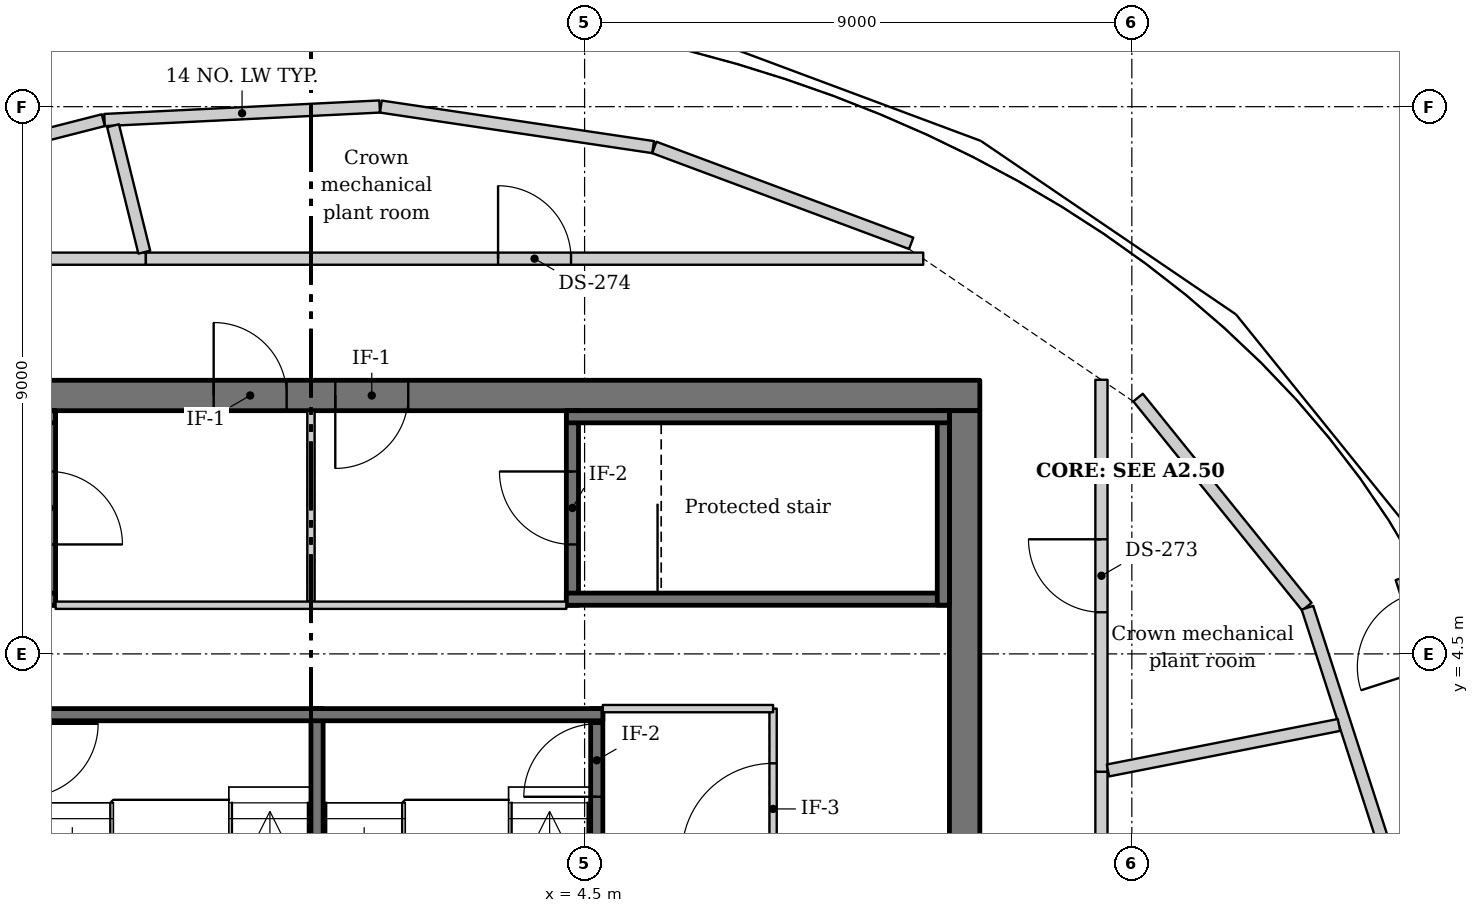
"""IFC4 building model, lengths in metres.
Left out: names, types, materials, properties, quantities, classifications, styles, units other than length and angle.
Written with IfcOpenShell. Run it as: python <this file> out.ifc"""

import sys

from ifc_helpers import new_model, si_unit, direction, frame, frame_2d, origin, place, context, subcontext, project, spatial, rectangle, extrude, source, transform, mapped, element, fill, save


model = new_model("IFC4")
c1 = context("Model", 3, precision=1e-05, world=origin(), true_north=direction((0.0, 1.0)))
c2 = subcontext(c1, "Body", "Model", "MODEL_VIEW")
j1 = project(units=[si_unit("LENGTHUNIT", "METRE"), si_unit("PLANEANGLEUNIT", "RADIAN")], contexts=[c1])
p1 = place(None, origin())
s1 = spatial("IfcSite", under=j1, at=p1, CompositionType="ELEMENT")
p2 = place(p1, origin())
s2 = spatial("IfcBuilding", under=s1, at=p2, CompositionType="ELEMENT")
p3 = place(p2, frame((0.0, 0.0, 352.0)))
s3 = spatial("IfcBuildingStorey", under=s2, at=p3, CompositionType="ELEMENT", Elevation=352.0)
m1 = source(origin(), c2, "Body", "SweptSolid", [
    extrude(rectangle(XDim=22.0, YDim=0.5, at=frame_2d((11.0, 0.0))), origin(), (0.0, 0.0, 1.0), 4.25),
])
p4 = place(p3, frame((-11.0, 8.75, -0.25), z_axis=(0.0, 0.0, 1.0), x_axis=(1.0, 0.0, 0.0)))
e1 = element("IfcWall", 1, at=p4, inside=s3, PredefinedType="SHEAR", context=c2, shape_type="MappedRepresentation", body=[
    mapped(m1, transform((0.0, 0.0, 0.0))),
])
m2 = source(origin(), c2, "Body", "SweptSolid", [
    extrude(rectangle(XDim=1.2, YDim=2.1, at=frame_2d((0.6, 1.05))), frame((0.0, 0.26, 0.0), z_axis=(0.0, -1.0, 0.0), x_axis=(1.0, 0.0, 0.0)), (0.0, 0.0, 1.0), 0.52),
])
p5 = place(p4, frame((9.4, 0.0, 0.25)))
e2 = element("IfcOpeningElement", 2, at=p5, cuts=e1, PredefinedType="OPENING", context=c2, shape_type="MappedRepresentation", body=[
    mapped(m2, transform((0.0, 0.0, 0.0))),
])
p6 = place(p4, frame((11.4, 0.0, 0.25)))
e3 = element("IfcOpeningElement", 3, at=p6, cuts=e1, PredefinedType="OPENING", context=c2, shape_type="MappedRepresentation", body=[
    mapped(m2, transform((0.0, 0.0, 0.0))),
])
m3 = source(origin(), c2, "Body", "SweptSolid", [
    extrude(rectangle(XDim=17.0, YDim=0.5, at=frame_2d((8.5, 0.0))), origin(), (0.0, 0.0, 1.0), 4.25),
])
p7 = place(p3, frame((10.75, -8.5, -0.25), z_axis=(0.0, 0.0, 1.0), x_axis=(0.0, 1.0, 0.0)))
e4 = element("IfcWall", 4, at=p7, inside=s3, PredefinedType="SHEAR", context=c2, shape_type="MappedRepresentation", body=[
    mapped(m3, transform((0.0, 0.0, 0.0))),
])
m4 = source(origin(), c2, "Body", "SweptSolid", [
    extrude(rectangle(XDim=1.5, YDim=2.1, at=frame_2d((0.75, 1.05))), frame((0.0, 0.26, 0.0), z_axis=(0.0, -1.0, 0.0), x_axis=(1.0, 0.0, 0.0)), (0.0, 0.0, 1.0), 0.52),
])
p8 = place(p7, frame((7.75, 0.0, 0.25)))
e5 = element("IfcOpeningElement", 5, at=p8, cuts=e4, PredefinedType="OPENING", context=c2, shape_type="MappedRepresentation", body=[
    mapped(m4, transform((0.0, 0.0, 0.0))),
])
m5 = source(origin(), c2, "Body", "SweptSolid", [
    extrude(rectangle(XDim=4.419, YDim=0.2, at=frame_2d((2.209, 0.0))), origin(), (0.0, 0.0, 1.0), 4.0),
])
p9 = place(p3, frame((13.602, 8.716, 0.0), z_axis=(0.0, 0.0, 1.0), x_axis=(0.628124910936, -0.778112521594, 0.0)))
e6 = element("IfcWall", 6, at=p9, inside=s3, PredefinedType="SOLIDWALL", context=c2, shape_type="MappedRepresentation", body=[
    mapped(m5, transform((0.0, 0.0, 0.0))),
])
m6 = source(origin(), c2, "Body", "SweptSolid", [
    extrude(rectangle(XDim=4.51, YDim=0.2, at=frame_2d((2.255, 0.0))), origin(), (0.0, 0.0, 1.0), 4.0),
])
p10 = place(p3, frame((5.646, 12.83, 0.0), z_axis=(0.0, 0.0, 1.0), x_axis=(0.936857596237, -0.349711087004, 0.0)))
e7 = element("IfcWall", 7, at=p10, inside=s3, PredefinedType="SOLIDWALL", context=c2, shape_type="MappedRepresentation", body=[
    mapped(m6, transform((0.0, 0.0, 0.0))),
])
m7 = source(origin(), c2, "Body", "SweptSolid", [
    extrude(rectangle(XDim=4.527, YDim=0.2, at=frame_2d((2.263, 0.0))), origin(), (0.0, 0.0, 1.0), 4.0),
])
p11 = place(p3, frame((1.149, 13.502, 0.0), z_axis=(0.0, 0.0, 1.0), x_axis=(0.98908499412, -0.147346104146, 0.0)))
e8 = element("IfcWall", 8, at=p11, inside=s3, PredefinedType="SOLIDWALL", context=c2, shape_type="MappedRepresentation", body=[
    mapped(m7, transform((0.0, 0.0, 0.0))),
])
m8 = source(origin(), c2, "Body", "SweptSolid", [
    extrude(rectangle(XDim=4.53, YDim=0.2, at=frame_2d((2.265, 0.0))), origin(), (0.0, 0.0, 1.0), 4.0),
])
p12 = place(p3, frame((-3.396, 13.281, 0.0), z_axis=(0.0, 0.0, 1.0), x_axis=(0.998794180323, 0.049093638625, 0.0)))
e9 = element("IfcWall", 9, at=p12, inside=s3, PredefinedType="SOLIDWALL", context=c2, shape_type="MappedRepresentation", body=[
    mapped(m8, transform((0.0, 0.0, 0.0))),
])
m9 = source(origin(), c2, "Body", "SweptSolid", [
    extrude(rectangle(XDim=4.52, YDim=0.2, at=frame_2d((2.26, 0.0))), origin(), (0.0, 0.0, 1.0), 4.0),
])
p13 = place(p3, frame((-7.795, 12.16, 0.0), z_axis=(0.0, 0.0, 1.0), x_axis=(0.968962042594, 0.247209546764, 0.0)))
e10 = element("IfcWall", 10, at=p13, inside=s3, PredefinedType="SOLIDWALL", context=c2, shape_type="MappedRepresentation", body=[
    mapped(m9, transform((0.0, 0.0, 0.0))),
])
m10 = source(origin(), c2, "Body", "SweptSolid", [
    extrude(rectangle(XDim=4.364, YDim=0.2, at=frame_2d((2.182, 0.0))), origin(), (0.0, 0.0, 1.0), 4.0),
])
p14 = place(p3, frame((16.388, 5.26, 0.0), z_axis=(0.0, 0.0, 1.0), x_axis=(0.307571534743, -0.951524960795, 0.0)))
e11 = element("IfcWall", 11, at=p14, inside=s3, PredefinedType="SOLIDWALL", context=c2, shape_type="MappedRepresentation", body=[
    mapped(m10, transform((0.0, 0.0, 0.0))),
])
m11 = source(origin(), c2, "Body", "SweptSolid", [
    extrude(rectangle(XDim=4.645, YDim=0.3, at=frame_2d((2.322, 0.0))), origin(), (0.0, 0.0, 1.0), 2.6),
])
p15 = place(p3, frame((19.41, 1.341, 0.0), z_axis=(0.0, 0.0, 1.0), x_axis=(-0.307431215292, 0.951570306317, 0.0)))
e12 = element("IfcWall", 12, at=p15, inside=s3, PredefinedType="SOLIDWALL", context=c2, shape_type="MappedRepresentation", body=[
    mapped(m11, transform((0.0, 0.0, 0.0))),
])
m12 = source(origin(), c2, "Body", "SweptSolid", [
    extrude(rectangle(XDim=1.25, YDim=2.3, at=frame_2d((0.625, 1.15))), frame((0.0, 0.16, 0.0), z_axis=(0.0, -1.0, 0.0), x_axis=(1.0, 0.0, 0.0)), (0.0, 0.0, 1.0), 0.32),
])
p16 = place(p15, frame((3.095, 0.0, 0.0)))
e13 = element("IfcOpeningElement", 13, at=p16, cuts=e12, PredefinedType="OPENING", context=c2, shape_type="MappedRepresentation", body=[
    mapped(m12, transform((0.0, 0.0, 0.0))),
])
m13 = source(origin(), c2, "Body", "SweptSolid", [
    extrude(rectangle(XDim=7.2, YDim=0.2, at=frame_2d((3.6, 0.0))), origin(), (0.0, 0.0, 1.0), 4.0),
])
p17 = place(p3, frame((0.1, 3.6, 0.0), z_axis=(0.0, 0.0, 1.0), x_axis=(0.0, -1.0, 0.0)))
e14 = element("IfcWall", 14, at=p17, inside=s3, PredefinedType="SHEAR", context=c2, shape_type="MappedRepresentation", body=[
    mapped(m13, transform((0.0, 0.0, 0.0))),
])
p18 = place(p3, frame((4.7, -3.6, 0.0), z_axis=(0.0, 0.0, 1.0), x_axis=(0.0, 1.0, 0.0)))
e15 = element("IfcWall", 15, at=p18, inside=s3, PredefinedType="SHEAR", context=c2, shape_type="MappedRepresentation", body=[
    mapped(m13, transform((0.0, 0.0, 0.0))),
])
m14 = source(origin(), c2, "Body", "SweptSolid", [
    extrude(rectangle(XDim=1.2, YDim=2.1, at=frame_2d((0.6, 1.05))), frame((0.0, 0.11, 0.0), z_axis=(0.0, -1.0, 0.0), x_axis=(1.0, 0.0, 0.0)), (0.0, 0.0, 1.0), 0.22),
])
p19 = place(p18, frame((5.75, 0.0, 0.0)))
e16 = element("IfcOpeningElement", 16, at=p19, cuts=e15, PredefinedType="OPENING", context=c2, shape_type="MappedRepresentation", body=[
    mapped(m14, transform((0.0, 0.0, 0.0))),
])
m15 = source(origin(), c2, "Body", "SweptSolid", [
    extrude(rectangle(XDim=9.6, YDim=0.2, at=frame_2d((4.8, 0.0))), origin(), (0.0, 0.0, 1.0), 4.0),
])
p20 = place(p3, frame((4.8, 3.5, 0.0), z_axis=(0.0, 0.0, 1.0), x_axis=(-1.0, 0.0, 0.0)))
e17 = element("IfcWall", 17, at=p20, inside=s3, PredefinedType="SHEAR", context=c2, shape_type="MappedRepresentation", body=[
    mapped(m15, transform((0.0, 0.0, 0.0))),
])
m16 = source(origin(), c2, "Body", "SweptSolid", [
    extrude(rectangle(XDim=3.3, YDim=0.12, at=frame_2d((1.65, 0.0))), origin(), (0.0, 0.0, 1.0), 3.5),
])
p21 = place(p3, frame((7.6, 0.3, 0.0), z_axis=(0.0, 0.0, 1.0), x_axis=(0.0, 1.0, 0.0)))
e18 = element("IfcWall", 18, at=p21, inside=s3, PredefinedType="PARTITIONING", context=c2, shape_type="MappedRepresentation", body=[
    mapped(m16, transform((0.0, 0.0, 0.0))),
])
m17 = source(origin(), c2, "Body", "SweptSolid", [
    extrude(rectangle(XDim=1.5, YDim=2.1, at=frame_2d((0.75, 1.05))), frame((0.0, 0.07, 0.0), z_axis=(0.0, -1.0, 0.0), x_axis=(1.0, 0.0, 0.0)), (0.0, 0.0, 1.0), 0.14),
])
p22 = place(p21, frame((0.9, 0.0, 0.0)))
e19 = element("IfcOpeningElement", 19, at=p22, cuts=e18, PredefinedType="OPENING", context=c2, shape_type="MappedRepresentation", body=[
    mapped(m17, transform((0.0, 0.0, 0.0))),
])
m18 = source(origin(), c2, "Body", "SweptSolid", [
    extrude(rectangle(XDim=2.8, YDim=0.12, at=frame_2d((1.4, 0.0))), origin(), (0.0, 0.0, 1.0), 3.5),
])
p23 = place(p3, frame((7.6, 3.6, 0.0), z_axis=(0.0, 0.0, 1.0), x_axis=(-1.0, 0.0, 0.0)))
e20 = element("IfcWall", 20, at=p23, inside=s3, PredefinedType="PARTITIONING", context=c2, shape_type="MappedRepresentation", body=[
    mapped(m18, transform((0.0, 0.0, 0.0))),
])
m19 = source(origin(), c2, "Body", "SweptSolid", [
    extrude(rectangle(XDim=3.2, YDim=0.2, at=frame_2d((1.6, 0.0))), origin(), (0.0, 0.0, 1.0), 4.0),
])
p24 = place(p3, frame((-4.3, 5.3, 0.0), z_axis=(0.0, 0.0, 1.0), x_axis=(0.0, 1.0, 0.0)))
e21 = element("IfcWall", 21, at=p24, inside=s3, PredefinedType="SHEAR", context=c2, shape_type="MappedRepresentation", body=[
    mapped(m19, transform((0.0, 0.0, 0.0))),
])
p25 = place(p24, frame((1.0, 0.0, 0.0)))
e22 = element("IfcOpeningElement", 22, at=p25, cuts=e21, PredefinedType="OPENING", context=c2, shape_type="MappedRepresentation", body=[
    mapped(m14, transform((0.0, 0.0, 0.0))),
])
m20 = source(origin(), c2, "Body", "SweptSolid", [
    extrude(rectangle(XDim=6.3, YDim=0.2, at=frame_2d((3.15, 0.0))), origin(), (0.0, 0.0, 1.0), 4.0),
])
p26 = place(p3, frame((-10.5, 5.4, 0.0), z_axis=(0.0, 0.0, 1.0), x_axis=(1.0, 0.0, 0.0)))
e23 = element("IfcWall", 23, at=p26, inside=s3, PredefinedType="SHEAR", context=c2, shape_type="MappedRepresentation", body=[
    mapped(m20, transform((0.0, 0.0, 0.0))),
])
m21 = source(origin(), c2, "Body", "SweptSolid", [
    extrude(rectangle(XDim=3.14, YDim=0.12, at=frame_2d((1.57, 0.0))), origin(), (0.0, 0.0, 1.0), 3.5),
])
p27 = place(p3, frame((0.0, 5.36, 0.0), z_axis=(0.0, 0.0, 1.0), x_axis=(0.0, 1.0, 0.0)))
e24 = element("IfcWall", 24, at=p27, inside=s3, PredefinedType="PARTITIONING", context=c2, shape_type="MappedRepresentation", body=[
    mapped(m21, transform((0.0, 0.0, 0.0))),
])
m22 = source(origin(), c2, "Body", "SweptSolid", [
    extrude(rectangle(XDim=8.4, YDim=0.12, at=frame_2d((4.2, 0.0))), origin(), (0.0, 0.0, 1.0), 3.5),
])
p28 = place(p3, frame((-4.2, 5.3, 0.0), z_axis=(0.0, 0.0, 1.0), x_axis=(1.0, 0.0, 0.0)))
e25 = element("IfcWall", 25, at=p28, inside=s3, PredefinedType="PARTITIONING", context=c2, shape_type="MappedRepresentation", body=[
    mapped(m22, transform((0.0, 0.0, 0.0))),
])
p29 = place(p3, frame((4.3, 8.5, 0.0), z_axis=(0.0, 0.0, 1.0), x_axis=(0.0, -1.0, 0.0)))
e26 = element("IfcWall", 26, at=p29, inside=s3, PredefinedType="SHEAR", context=c2, shape_type="MappedRepresentation", body=[
    mapped(m19, transform((0.0, 0.0, 0.0))),
])
p30 = place(p29, frame((1.0, 0.0, 0.0)))
e27 = element("IfcOpeningElement", 27, at=p30, cuts=e26, PredefinedType="OPENING", context=c2, shape_type="MappedRepresentation", body=[
    mapped(m14, transform((0.0, 0.0, 0.0))),
])
p31 = place(p3, frame((4.2, 5.4, 0.0), z_axis=(0.0, 0.0, 1.0), x_axis=(1.0, 0.0, 0.0)))
e28 = element("IfcWall", 28, at=p31, inside=s3, PredefinedType="SHEAR", context=c2, shape_type="MappedRepresentation", body=[
    mapped(m20, transform((0.0, 0.0, 0.0))),
])
m23 = source(origin(), c2, "Body", "SweptSolid", [
    extrude(rectangle(XDim=6.298, YDim=0.2, at=frame_2d((3.149, 0.0))), origin(), (0.0, 0.0, 1.0), 4.0),
])
p32 = place(p3, frame((-4.202, 8.4, 0.0), z_axis=(0.0, 0.0, 1.0), x_axis=(-1.0, 0.0, 0.0)))
e29 = element("IfcWall", 29, at=p32, inside=s3, PredefinedType="SHEAR", context=c2, shape_type="MappedRepresentation", body=[
    mapped(m23, transform((0.0, 0.0, 0.0))),
])
m24 = source(origin(), c2, "Body", "SweptSolid", [
    extrude(rectangle(XDim=3.198, YDim=0.2, at=frame_2d((1.599, 0.0))), origin(), (0.0, 0.0, 1.0), 4.0),
])
p33 = place(p3, frame((10.4, 5.302, 0.0), z_axis=(0.0, 0.0, 1.0), x_axis=(0.0, 1.0, 0.0)))
e30 = element("IfcWall", 30, at=p33, inside=s3, PredefinedType="SHEAR", context=c2, shape_type="MappedRepresentation", body=[
    mapped(m24, transform((0.0, 0.0, 0.0))),
])
p34 = place(p3, frame((10.5, 8.4, 0.0), z_axis=(0.0, 0.0, 1.0), x_axis=(-1.0, 0.0, 0.0)))
e31 = element("IfcWall", 31, at=p34, inside=s3, PredefinedType="SHEAR", context=c2, shape_type="MappedRepresentation", body=[
    mapped(m23, transform((0.0, 0.0, 0.0))),
])
m25 = source(origin(), c2, "Body", "SweptSolid", [
    extrude(rectangle(XDim=6.985, YDim=0.2, at=frame_2d((3.492, 0.0))), origin(), (0.0, 0.0, 1.0), 4.0),
])
p35 = place(p3, frame((-9.7, 11.0, 0.0), z_axis=(0.0, 0.0, 1.0), x_axis=(1.0, 0.0, 0.0)))
e32 = element("IfcWall", 32, at=p35, inside=s3, PredefinedType="PARTITIONING", context=c2, shape_type="MappedRepresentation", body=[
    mapped(m25, transform((0.0, 0.0, 0.0))),
])
p36 = place(p35, frame((2.892, 0.0, 0.0)))
e33 = element("IfcOpeningElement", 33, at=p36, cuts=e32, PredefinedType="OPENING", context=c2, shape_type="MappedRepresentation", body=[
    mapped(m14, transform((0.0, 0.0, 0.0))),
])
m26 = source(origin(), c2, "Body", "SweptSolid", [
    extrude(rectangle(XDim=2.143, YDim=0.2, at=frame_2d((1.071, 0.0))), origin(), (0.0, 0.0, 1.0), 4.0),
])
p37 = place(p3, frame((-2.741, 11.107, 0.0), z_axis=(0.0, 0.0, 1.0), x_axis=(-0.239853646519, 0.970809058596, 0.0)))
e34 = element("IfcWall", 34, at=p37, inside=s3, PredefinedType="PARTITIONING", context=c2, shape_type="MappedRepresentation", body=[
    mapped(m26, transform((0.0, 0.0, 0.0))),
])
m27 = source(origin(), c2, "Body", "SweptSolid", [
    extrude(rectangle(XDim=12.784, YDim=0.2, at=frame_2d((6.392, 0.0))), origin(), (0.0, 0.0, 1.0), 4.0),
])
p38 = place(p3, frame((-2.715, 11.0, 0.0), z_axis=(0.0, 0.0, 1.0), x_axis=(1.0, 0.0, 0.0)))
e35 = element("IfcWall", 35, at=p38, inside=s3, PredefinedType="PARTITIONING", context=c2, shape_type="MappedRepresentation", body=[
    mapped(m27, transform((0.0, 0.0, 0.0))),
])
p39 = place(p38, frame((5.792, 0.0, 0.0)))
e36 = element("IfcOpeningElement", 36, at=p39, cuts=e35, PredefinedType="OPENING", context=c2, shape_type="MappedRepresentation", body=[
    mapped(m14, transform((0.0, 0.0, 0.0))),
])
m28 = source(origin(), c2, "Body", "SweptSolid", [
    extrude(rectangle(XDim=11.404, YDim=0.2, at=frame_2d((5.702, 0.0))), origin(), (0.0, 0.0, 1.0), 4.0),
])
p40 = place(p3, frame((13.0, 2.562, 0.0), z_axis=(0.0, 0.0, 1.0), x_axis=(0.0, -1.0, 0.0)))
e37 = element("IfcWall", 37, at=p40, inside=s3, PredefinedType="PARTITIONING", context=c2, shape_type="MappedRepresentation", body=[
    mapped(m28, transform((0.0, 0.0, 0.0))),
])
p41 = place(p40, frame((5.102, 0.0, 0.0)))
e38 = element("IfcOpeningElement", 38, at=p41, cuts=e37, PredefinedType="OPENING", context=c2, shape_type="MappedRepresentation", body=[
    mapped(m14, transform((0.0, 0.0, 0.0))),
])
m29 = source(origin(), c2, "Body", "SweptSolid", [
    extrude(rectangle(XDim=6.446, YDim=0.2, at=frame_2d((3.223, 0.0))), origin(), (0.0, 0.0, 1.0), 4.0),
])
p42 = place(p3, frame((13.0, 9.008, 0.0), z_axis=(0.0, 0.0, 1.0), x_axis=(0.0, -1.0, 0.0)))
e39 = element("IfcWall", 39, at=p42, inside=s3, PredefinedType="PARTITIONING", context=c2, shape_type="MappedRepresentation", body=[
    mapped(m29, transform((0.0, 0.0, 0.0))),
])
p43 = place(p42, frame((2.623, 0.0, 0.0)))
e40 = element("IfcOpeningElement", 40, at=p43, cuts=e39, PredefinedType="OPENING", context=c2, shape_type="MappedRepresentation", body=[
    mapped(m14, transform((0.0, 0.0, 0.0))),
])
m30 = source(origin(), c2, "Body", "SweptSolid", [
    extrude(rectangle(XDim=3.871, YDim=0.2, at=frame_2d((1.936, 0.0))), origin(), (0.0, 0.0, 1.0), 4.0),
])
p44 = place(p3, frame((16.906, 3.331, 0.0), z_axis=(0.0, 0.0, 1.0), x_axis=(-0.981151353157, -0.193240839884, 0.0)))
e41 = element("IfcWall", 41, at=p44, inside=s3, PredefinedType="PARTITIONING", context=c2, shape_type="MappedRepresentation", body=[
    mapped(m30, transform((0.0, 0.0, 0.0))),
])
m31 = source(origin(), c2, "Body", "SweptSolid", [
    extrude(rectangle(XDim=1.2, YDim=2.1, at=frame_2d((0.6, 1.05))), frame((0.0, 0.025, 0.0), z_axis=(0.0, -1.0, 0.0), x_axis=(1.0, 0.0, 0.0)), (0.0, 0.0, 1.0), 0.05),
])
p45 = place(p19, origin())
e42 = element("IfcDoor", 42, at=p45, inside=s3, OperationType="SINGLE_SWING_RIGHT", PredefinedType="DOOR", context=c2, shape_type="MappedRepresentation", body=[
    mapped(m31, transform((0.0, 0.0, 0.0))),
])
fill(e16, e42)
p46 = place(p5, origin())
e43 = element("IfcDoor", 43, at=p46, inside=s3, OperationType="SINGLE_SWING_LEFT", PredefinedType="DOOR", context=c2, shape_type="MappedRepresentation", body=[
    mapped(m31, transform((0.0, 0.0, 0.0))),
])
fill(e2, e43)
p47 = place(p30, origin())
e44 = element("IfcDoor", 44, at=p47, inside=s3, OperationType="SINGLE_SWING_LEFT", PredefinedType="DOOR", context=c2, shape_type="MappedRepresentation", body=[
    mapped(m31, transform((0.0, 0.0, 0.0))),
])
fill(e27, e44)
p48 = place(p6, origin())
e45 = element("IfcDoor", 45, at=p48, inside=s3, OperationType="SINGLE_SWING_RIGHT", PredefinedType="DOOR", context=c2, shape_type="MappedRepresentation", body=[
    mapped(m31, transform((0.0, 0.0, 0.0))),
])
fill(e3, e45)
m32 = source(origin(), c2, "Body", "SweptSolid", [
    extrude(rectangle(XDim=1.5, YDim=2.1, at=frame_2d((0.75, 1.05))), frame((0.0, 0.025, 0.0), z_axis=(0.0, -1.0, 0.0), x_axis=(1.0, 0.0, 0.0)), (0.0, 0.0, 1.0), 0.05),
])
p49 = place(p22, origin())
e46 = element("IfcDoor", 46, at=p49, inside=s3, OperationType="DOUBLE_DOOR_SINGLE_SWING", PredefinedType="DOOR", context=c2, shape_type="MappedRepresentation", body=[
    mapped(m32, transform((0.0, 0.0, 0.0))),
])
fill(e19, e46)
m33 = source(origin(), c2, "Body", "SweptSolid", [
    extrude(rectangle(XDim=1.2, YDim=2.1, at=frame_2d((0.6, 1.05))), frame((0.0, 0.025, 0.0), z_axis=(0.0, -1.0, 0.0), x_axis=(1.0, 0.0, 0.0)), (0.0, 0.0, 1.0), 0.05),
])
p50 = place(p43, origin())
e47 = element("IfcDoor", 47, at=p50, inside=s3, OperationType="SINGLE_SWING_LEFT", PredefinedType="DOOR", context=c2, shape_type="MappedRepresentation", body=[
    mapped(m33, transform((0.0, 0.0, 0.0))),
])
fill(e40, e47)
p51 = place(p39, origin())
e48 = element("IfcDoor", 48, at=p51, inside=s3, OperationType="SINGLE_SWING_LEFT", PredefinedType="DOOR", context=c2, shape_type="MappedRepresentation", body=[
    mapped(m33, transform((0.0, 0.0, 0.0))),
])
fill(e36, e48)
save(model, sys.argv[1])
